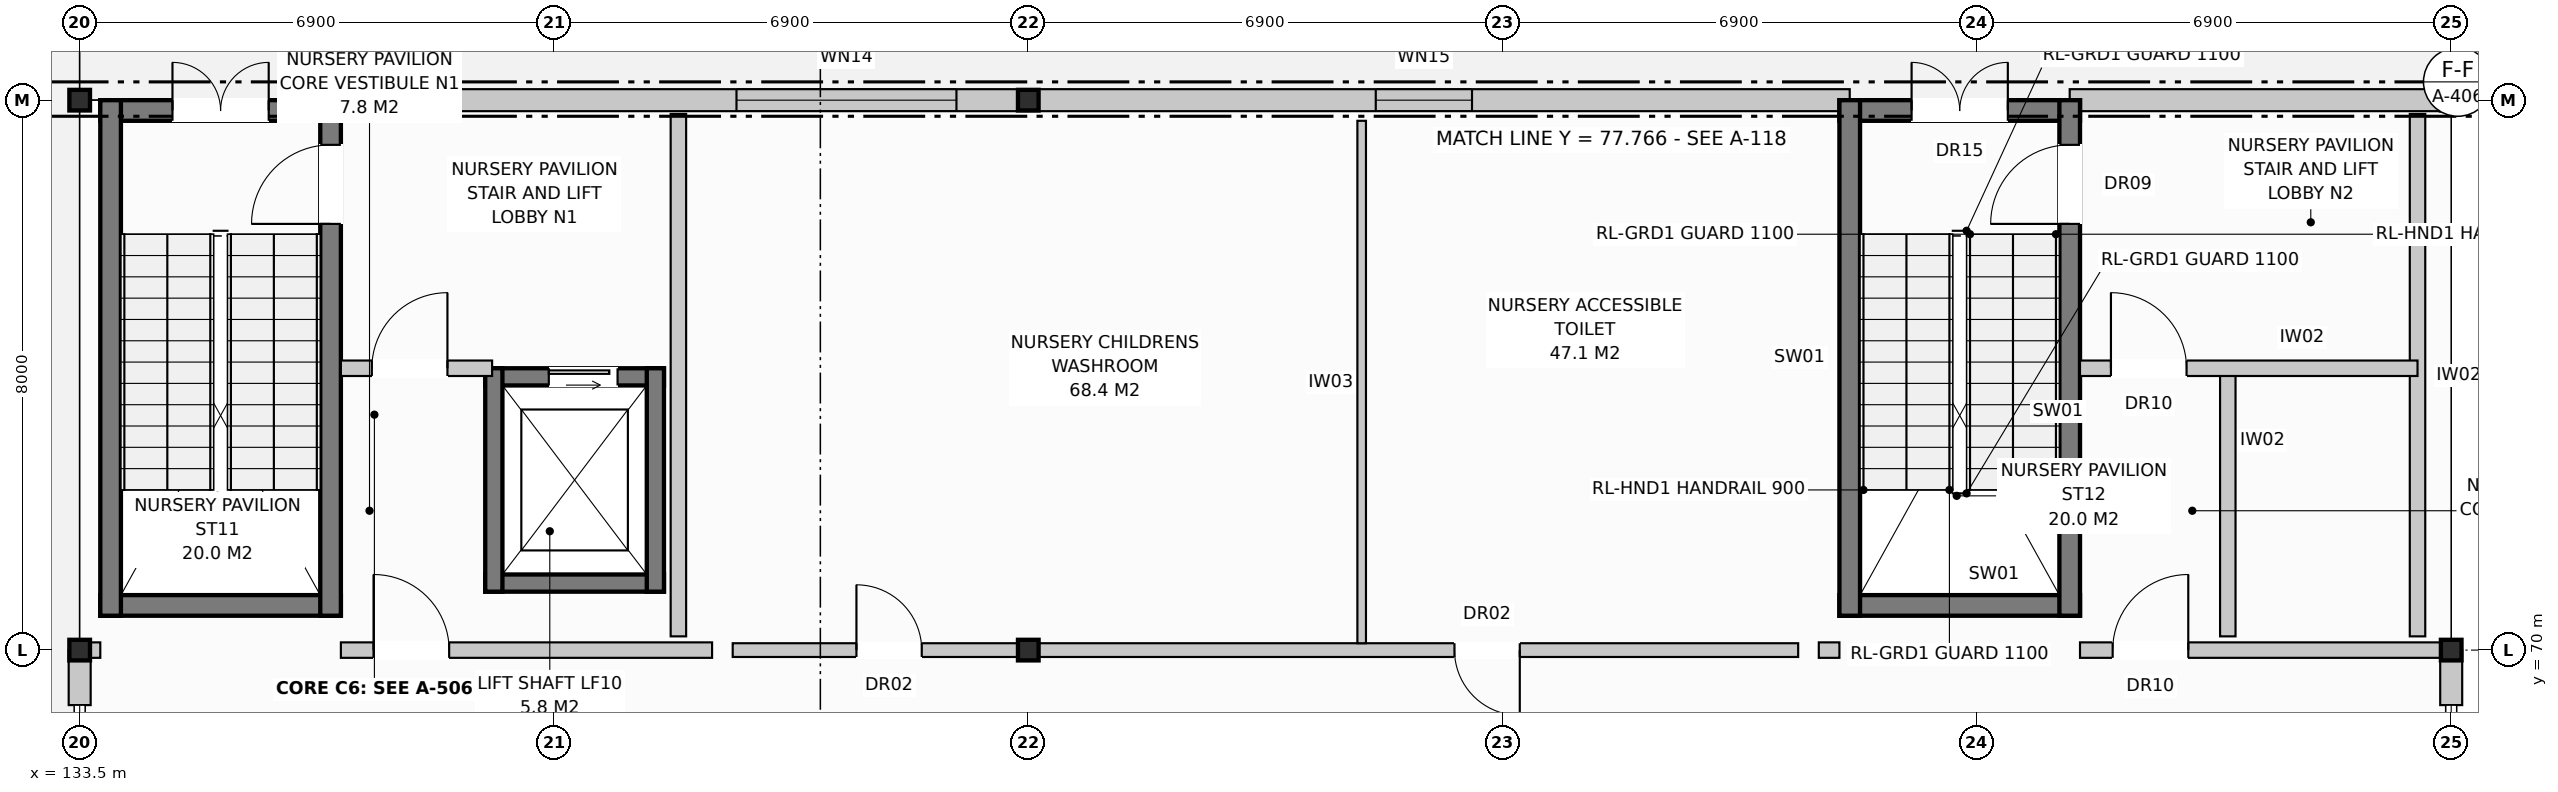
"""IFC4 building model, lengths in metres.
Left out: names, types, materials, properties, quantities, classifications, styles, units other than length and angle.
Written with IfcOpenShell. Run it as: python <this file> out.ifc"""

import sys

from ifc_helpers import new_model, si_unit, direction, frame, frame_2d, origin, origin_with_axes, origin_2d, place, context, subcontext, project, spatial, rectangle, i_section, extrude, element, fill, save


model = new_model("IFC4")
c1 = context("Model", 3, precision=1e-05, world=origin(), true_north=direction((0.0, 1.0)))
c2 = subcontext(c1, "Body", "Model", "MODEL_VIEW")
j1 = project(units=[si_unit("LENGTHUNIT", "METRE"), si_unit("PLANEANGLEUNIT", "RADIAN")], contexts=[c1])
p1 = place(None, origin())
s1 = spatial("IfcSite", under=j1, at=p1, CompositionType="ELEMENT")
p2 = place(p1, origin())
s2 = spatial("IfcBuilding", under=s1, at=p2, CompositionType="ELEMENT")
p3 = place(p2, origin())
s3 = spatial("IfcBuildingStorey", under=s2, at=p3, CompositionType="ELEMENT", Elevation=0.0)
for number, where, z_axis, x_axis in (
    (1, (133.5, 70.0, 0.0), (0.0, 0.0, 1.0), (1.0, 0.0, 0.0)),
    (2, (133.5, 78.0, 0.0), (0.0, 0.0, 1.0), (1.0, 0.0, 0.0)),
    (3, (147.3, 70.0, 0.0), (0.0, 0.0, 1.0), (1.0, 0.0, 0.0)),
    (4, (147.3, 78.0, 0.0), (0.0, 0.0, 1.0), (1.0, 0.0, 0.0)),
    (5, (168.0, 70.0, 0.0), (0.0, 0.0, 1.0), (1.0, 0.0, 0.0)),
    (6, (168.0, 78.0, 0.0), (0.0, 0.0, 1.0), (1.0, 0.0, 0.0)),
):
    element("IfcColumn", number, at=place(p3, frame(where, z_axis=z_axis, x_axis=x_axis)), inside=s3, PredefinedType="COLUMN", context=c2, shape_type="SweptSolid", body=[
        extrude(i_section(OverallWidth=0.3, OverallDepth=0.3, WebThickness=0.011, FlangeThickness=0.019, at=origin_2d()), origin(), (0.0, 0.0, 1.0), 4.4),
    ])
for number, where, z_axis, x_axis in (
    (7, (133.5, 69.2, 0.0), (0.0, 0.0, 1.0), (0.0, 1.0, 0.0)),
    (8, (168.0, 69.2, 0.0), (0.0, 0.0, 1.0), (0.0, 1.0, 0.0)),
):
    element("IfcWall", number, at=place(p3, frame(where, z_axis=z_axis, x_axis=x_axis)), inside=s3, PredefinedType="STANDARD", context=c2, shape_type="SweptSolid", body=[
        extrude(rectangle(XDim=0.8, YDim=0.32, at=frame_2d((0.4, 0.0))), origin(), (0.0, 0.0, 1.0), 3.66),
    ])
p4 = place(p3, frame((137.05, 78.0, 0.0), z_axis=(0.0, 0.0, 1.0), x_axis=(1.0, 0.0, 0.0)))
e9 = element("IfcWall", 9, at=p4, inside=s3, PredefinedType="STANDARD", context=c2, shape_type="SweptSolid", body=[
    extrude(rectangle(XDim=22.2, YDim=0.32, at=frame_2d((11.1, 0.0))), origin(), (0.0, 0.0, 1.0), 3.57),
])
p5 = place(p4, frame((6.005, 0.0, 0.95)))
e10 = element("IfcOpeningElement", 10, at=p5, cuts=e9, PredefinedType="OPENING", context=c2, shape_type="SweptSolid", body=[
    extrude(rectangle(XDim=3.2, YDim=2.2, at=frame_2d((1.6, 1.1))), frame((0.0, 0.172, 0.0), z_axis=(0.0, -1.0, 0.0), x_axis=(1.0, 0.0, 0.0)), (0.0, 0.0, 1.0), 0.344),
])
p6 = place(p4, frame((15.305, 0.0, 1.05)))
e11 = element("IfcOpeningElement", 11, at=p6, cuts=e9, PredefinedType="OPENING", context=c2, shape_type="SweptSolid", body=[
    extrude(rectangle(XDim=1.4, YDim=1.25, at=frame_2d((0.7, 0.625))), frame((0.0, 0.172, 0.0), z_axis=(0.0, -1.0, 0.0), x_axis=(1.0, 0.0, 0.0)), (0.0, 0.0, 1.0), 0.344),
])
p7 = place(p3, frame((162.45, 78.0, 0.0), z_axis=(0.0, 0.0, 1.0), x_axis=(1.0, 0.0, 0.0)))
e12 = element("IfcWall", 12, at=p7, inside=s3, PredefinedType="STANDARD", context=c2, shape_type="SweptSolid", body=[
    extrude(rectangle(XDim=5.55, YDim=0.32, at=frame_2d((2.775, 0.0))), origin(), (0.0, 0.0, 1.0), 3.57),
])
p8 = place(p3, frame((133.8, 77.85, 0.0), z_axis=(0.0, 0.0, 1.0), x_axis=(1.0, 0.0, 0.0)))
e13 = element("IfcWall", 13, at=p8, inside=s3, PredefinedType="SHEAR", context=c2, shape_type="SweptSolid", body=[
    extrude(rectangle(XDim=3.5, YDim=0.3, at=frame_2d((1.75, 0.0))), origin(), (0.0, 0.0, 1.0), 4.12),
])
p9 = place(p8, frame((1.05, 0.0, 0.0)))
e14 = element("IfcOpeningElement", 14, at=p9, cuts=e13, PredefinedType="OPENING", context=c2, shape_type="SweptSolid", body=[
    extrude(rectangle(XDim=1.4, YDim=2.25, at=frame_2d((0.7, 1.125))), frame((0.0, 0.162, 0.0), z_axis=(0.0, -1.0, 0.0), x_axis=(1.0, 0.0, 0.0)), (0.0, 0.0, 1.0), 0.324),
])
p10 = place(p3, frame((133.8, 70.65, 0.0), z_axis=(0.0, 0.0, 1.0), x_axis=(1.0, 0.0, 0.0)))
e15 = element("IfcWall", 15, at=p10, inside=s3, PredefinedType="SHEAR", context=c2, shape_type="SweptSolid", body=[
    extrude(rectangle(XDim=3.5, YDim=0.3, at=frame_2d((1.75, 0.0))), origin(), (0.0, 0.0, 1.0), 4.12),
])
p11 = place(p3, frame((133.95, 70.5, 0.0), z_axis=(0.0, 0.0, 1.0), x_axis=(0.0, 1.0, 0.0)))
e16 = element("IfcWall", 16, at=p11, inside=s3, PredefinedType="SHEAR", context=c2, shape_type="SweptSolid", body=[
    extrude(rectangle(XDim=7.5, YDim=0.3, at=frame_2d((3.75, 0.0))), origin(), (0.0, 0.0, 1.0), 4.12),
])
p12 = place(p3, frame((137.15, 70.5, 0.0), z_axis=(0.0, 0.0, 1.0), x_axis=(0.0, 1.0, 0.0)))
e17 = element("IfcWall", 17, at=p12, inside=s3, PredefinedType="SHEAR", context=c2, shape_type="SweptSolid", body=[
    extrude(rectangle(XDim=7.5, YDim=0.3, at=frame_2d((3.75, 0.0))), origin(), (0.0, 0.0, 1.0), 4.12),
])
p13 = place(p12, frame((5.7, 0.0, 0.0)))
e18 = element("IfcOpeningElement", 18, at=p13, cuts=e17, PredefinedType="OPENING", context=c2, shape_type="SweptSolid", body=[
    extrude(rectangle(XDim=1.15, YDim=2.15, at=frame_2d((0.575, 1.075))), frame((0.0, 0.162, 0.0), z_axis=(0.0, -1.0, 0.0), x_axis=(1.0, 0.0, 0.0)), (0.0, 0.0, 1.0), 0.324),
])
p14 = place(p3, frame((139.4, 73.975, 0.0), z_axis=(0.0, 0.0, 1.0), x_axis=(1.0, 0.0, 0.0)))
e19 = element("IfcWall", 19, at=p14, inside=s3, PredefinedType="SHEAR", context=c2, shape_type="SweptSolid", body=[
    extrude(rectangle(XDim=2.6, YDim=0.25, at=frame_2d((1.3, 0.0))), origin(), (0.0, 0.0, 1.0), 4.12),
])
p15 = place(p14, frame((0.925, 0.0, 0.0)))
e20 = element("IfcOpeningElement", 20, at=p15, cuts=e19, PredefinedType="OPENING", context=c2, shape_type="SweptSolid", body=[
    extrude(rectangle(XDim=1.0, YDim=2.1, at=frame_2d((0.5, 1.05))), frame((0.0, 0.137, 0.0), z_axis=(0.0, -1.0, 0.0), x_axis=(1.0, 0.0, 0.0)), (0.0, 0.0, 1.0), 0.274),
])
p16 = place(p3, frame((139.4, 70.975, 0.0), z_axis=(0.0, 0.0, 1.0), x_axis=(1.0, 0.0, 0.0)))
e21 = element("IfcWall", 21, at=p16, inside=s3, PredefinedType="SHEAR", context=c2, shape_type="SweptSolid", body=[
    extrude(rectangle(XDim=2.6, YDim=0.25, at=frame_2d((1.3, 0.0))), origin(), (0.0, 0.0, 1.0), 4.12),
])
for number, where, z_axis, x_axis in (
    (22, (139.525, 70.85, 0.0), (0.0, 0.0, 1.0), (0.0, 1.0, 0.0)),
    (23, (141.875, 70.85, 0.0), (0.0, 0.0, 1.0), (0.0, 1.0, 0.0)),
):
    element("IfcWall", number, at=place(p3, frame(where, z_axis=z_axis, x_axis=x_axis)), inside=s3, PredefinedType="SHEAR", context=c2, shape_type="SweptSolid", body=[
        extrude(rectangle(XDim=3.25, YDim=0.25, at=frame_2d((1.625, 0.0))), origin(), (0.0, 0.0, 1.0), 4.12),
    ])
p17 = place(p3, frame((142.21, 70.2, 0.0), z_axis=(0.0, 0.0, 1.0), x_axis=(0.0, 1.0, 0.0)))
e24 = element("IfcWall", 24, at=p17, inside=s3, PredefinedType="PARTITIONING", context=c2, shape_type="SweptSolid", body=[
    extrude(rectangle(XDim=7.6, YDim=0.225, at=frame_2d((3.8, 0.0))), origin(), (0.0, 0.0, 1.0), 4.12),
])
p18 = place(p3, frame((137.3, 74.1, 0.0), z_axis=(0.0, 0.0, 1.0), x_axis=(1.0, 0.0, 0.0)))
e25 = element("IfcWall", 25, at=p18, inside=s3, PredefinedType="PARTITIONING", context=c2, shape_type="SweptSolid", body=[
    extrude(rectangle(XDim=2.2, YDim=0.225, at=frame_2d((1.1, 0.0))), origin(), (0.0, 0.0, 1.0), 4.12),
])
p19 = place(p18, frame((0.45, 0.0, 0.0)))
e26 = element("IfcOpeningElement", 26, at=p19, cuts=e25, PredefinedType="OPENING", context=c2, shape_type="SweptSolid", body=[
    extrude(rectangle(XDim=1.1, YDim=2.15, at=frame_2d((0.55, 1.075))), frame((0.0, 0.125, 0.0), z_axis=(0.0, -1.0, 0.0), x_axis=(1.0, 0.0, 0.0)), (0.0, 0.0, 1.0), 0.249),
])
p20 = place(p3, frame((133.65, 70.0, 0.0), z_axis=(0.0, 0.0, 1.0), x_axis=(1.0, 0.0, 0.0)))
e27 = element("IfcWall", 27, at=p20, inside=s3, PredefinedType="PARTITIONING", context=c2, shape_type="SweptSolid", body=[
    extrude(rectangle(XDim=0.15, YDim=0.225, at=frame_2d((0.075, 0.0))), origin(), (0.0, 0.0, 1.0), 4.12),
])
p21 = place(p3, frame((137.3, 70.0, 0.0), z_axis=(0.0, 0.0, 1.0), x_axis=(1.0, 0.0, 0.0)))
e28 = element("IfcWall", 28, at=p21, inside=s3, PredefinedType="PARTITIONING", context=c2, shape_type="SweptSolid", body=[
    extrude(rectangle(XDim=5.4, YDim=0.225, at=frame_2d((2.7, 0.0))), origin(), (0.0, 0.0, 1.0), 3.67),
])
p22 = place(p21, frame((0.475, 0.0, 0.0)))
e29 = element("IfcOpeningElement", 29, at=p22, cuts=e28, PredefinedType="OPENING", context=c2, shape_type="SweptSolid", body=[
    extrude(rectangle(XDim=1.1, YDim=2.15, at=frame_2d((0.55, 1.075))), frame((0.0, 0.125, 0.0), z_axis=(0.0, -1.0, 0.0), x_axis=(1.0, 0.0, 0.0)), (0.0, 0.0, 1.0), 0.249),
])
p23 = place(p3, frame((159.1, 77.85, 0.0), z_axis=(0.0, 0.0, 1.0), x_axis=(1.0, 0.0, 0.0)))
e30 = element("IfcWall", 30, at=p23, inside=s3, PredefinedType="SHEAR", context=c2, shape_type="SweptSolid", body=[
    extrude(rectangle(XDim=3.5, YDim=0.3, at=frame_2d((1.75, 0.0))), origin(), (0.0, 0.0, 1.0), 4.12),
])
p24 = place(p23, frame((1.05, 0.0, 0.0)))
e31 = element("IfcOpeningElement", 31, at=p24, cuts=e30, PredefinedType="OPENING", context=c2, shape_type="SweptSolid", body=[
    extrude(rectangle(XDim=1.4, YDim=2.25, at=frame_2d((0.7, 1.125))), frame((0.0, 0.162, 0.0), z_axis=(0.0, -1.0, 0.0), x_axis=(1.0, 0.0, 0.0)), (0.0, 0.0, 1.0), 0.324),
])
p25 = place(p3, frame((159.1, 70.65, 0.0), z_axis=(0.0, 0.0, 1.0), x_axis=(1.0, 0.0, 0.0)))
e32 = element("IfcWall", 32, at=p25, inside=s3, PredefinedType="SHEAR", context=c2, shape_type="SweptSolid", body=[
    extrude(rectangle(XDim=3.5, YDim=0.3, at=frame_2d((1.75, 0.0))), origin(), (0.0, 0.0, 1.0), 4.12),
])
p26 = place(p3, frame((159.25, 70.5, 0.0), z_axis=(0.0, 0.0, 1.0), x_axis=(0.0, 1.0, 0.0)))
e33 = element("IfcWall", 33, at=p26, inside=s3, PredefinedType="SHEAR", context=c2, shape_type="SweptSolid", body=[
    extrude(rectangle(XDim=7.5, YDim=0.3, at=frame_2d((3.75, 0.0))), origin(), (0.0, 0.0, 1.0), 4.12),
])
p27 = place(p3, frame((162.45, 70.5, 0.0), z_axis=(0.0, 0.0, 1.0), x_axis=(0.0, 1.0, 0.0)))
e34 = element("IfcWall", 34, at=p27, inside=s3, PredefinedType="SHEAR", context=c2, shape_type="SweptSolid", body=[
    extrude(rectangle(XDim=7.5, YDim=0.3, at=frame_2d((3.75, 0.0))), origin(), (0.0, 0.0, 1.0), 4.12),
])
p28 = place(p27, frame((5.7, 0.0, 0.0)))
e35 = element("IfcOpeningElement", 35, at=p28, cuts=e34, PredefinedType="OPENING", context=c2, shape_type="SweptSolid", body=[
    extrude(rectangle(XDim=1.15, YDim=2.15, at=frame_2d((0.575, 1.075))), frame((0.0, 0.162, 0.0), z_axis=(0.0, -1.0, 0.0), x_axis=(1.0, 0.0, 0.0)), (0.0, 0.0, 1.0), 0.324),
])
p29 = place(p3, frame((167.51, 70.2, 0.0), z_axis=(0.0, 0.0, 1.0), x_axis=(0.0, 1.0, 0.0)))
e36 = element("IfcWall", 36, at=p29, inside=s3, PredefinedType="PARTITIONING", context=c2, shape_type="SweptSolid", body=[
    extrude(rectangle(XDim=7.6, YDim=0.225, at=frame_2d((3.8, 0.0))), origin(), (0.0, 0.0, 1.0), 4.12),
])
p30 = place(p3, frame((164.75, 70.2, 0.0), z_axis=(0.0, 0.0, 1.0), x_axis=(0.0, 1.0, 0.0)))
e37 = element("IfcWall", 37, at=p30, inside=s3, PredefinedType="PARTITIONING", context=c2, shape_type="SweptSolid", body=[
    extrude(rectangle(XDim=3.8, YDim=0.225, at=frame_2d((1.9, 0.0))), origin(), (0.0, 0.0, 1.0), 4.12),
])
p31 = place(p3, frame((162.6, 74.1, 0.0), z_axis=(0.0, 0.0, 1.0), x_axis=(1.0, 0.0, 0.0)))
e38 = element("IfcWall", 38, at=p31, inside=s3, PredefinedType="PARTITIONING", context=c2, shape_type="SweptSolid", body=[
    extrude(rectangle(XDim=4.91, YDim=0.225, at=frame_2d((2.455, 0.0))), origin(), (0.0, 0.0, 1.0), 4.12),
])
p32 = place(p31, frame((0.45, 0.0, 0.0)))
e39 = element("IfcOpeningElement", 39, at=p32, cuts=e38, PredefinedType="OPENING", context=c2, shape_type="SweptSolid", body=[
    extrude(rectangle(XDim=1.1, YDim=2.15, at=frame_2d((0.55, 1.075))), frame((0.0, 0.125, 0.0), z_axis=(0.0, -1.0, 0.0), x_axis=(1.0, 0.0, 0.0)), (0.0, 0.0, 1.0), 0.249),
])
p33 = place(p3, frame((158.8, 70.0, 0.0), z_axis=(0.0, 0.0, 1.0), x_axis=(1.0, 0.0, 0.0)))
e40 = element("IfcWall", 40, at=p33, inside=s3, PredefinedType="PARTITIONING", context=c2, shape_type="SweptSolid", body=[
    extrude(rectangle(XDim=0.3, YDim=0.225, at=frame_2d((0.15, 0.0))), origin(), (0.0, 0.0, 1.0), 4.12),
])
p34 = place(p3, frame((162.6, 70.0, 0.0), z_axis=(0.0, 0.0, 1.0), x_axis=(1.0, 0.0, 0.0)))
e41 = element("IfcWall", 41, at=p34, inside=s3, PredefinedType="PARTITIONING", context=c2, shape_type="SweptSolid", body=[
    extrude(rectangle(XDim=5.25, YDim=0.225, at=frame_2d((2.625, 0.0))), origin(), (0.0, 0.0, 1.0), 3.57),
])
p35 = place(p34, frame((0.475, 0.0, 0.0)))
e42 = element("IfcOpeningElement", 42, at=p35, cuts=e41, PredefinedType="OPENING", context=c2, shape_type="SweptSolid", body=[
    extrude(rectangle(XDim=1.1, YDim=2.15, at=frame_2d((0.55, 1.075))), frame((0.0, 0.125, 0.0), z_axis=(0.0, -1.0, 0.0), x_axis=(1.0, 0.0, 0.0)), (0.0, 0.0, 1.0), 0.249),
])
p36 = place(p3, frame((143.0, 70.0, 0.0), z_axis=(0.0, 0.0, 1.0), x_axis=(1.0, 0.0, 0.0)))
e43 = element("IfcWall", 43, at=p36, inside=s3, PredefinedType="PARTITIONING", context=c2, shape_type="SweptSolid", body=[
    extrude(rectangle(XDim=15.5, YDim=0.2, at=frame_2d((7.75, 0.0))), origin(), (0.0, 0.0, 1.0), 3.57),
])
p37 = place(p36, frame((1.8, 0.0, 0.0)))
e44 = element("IfcOpeningElement", 44, at=p37, cuts=e43, PredefinedType="OPENING", context=c2, shape_type="SweptSolid", body=[
    extrude(rectangle(XDim=0.95, YDim=2.15, at=frame_2d((0.475, 1.075))), frame((0.0, 0.112, 0.0), z_axis=(0.0, -1.0, 0.0), x_axis=(1.0, 0.0, 0.0)), (0.0, 0.0, 1.0), 0.224),
])
p38 = place(p36, frame((10.5, 0.0, 0.0)))
e45 = element("IfcOpeningElement", 45, at=p38, cuts=e43, PredefinedType="OPENING", context=c2, shape_type="SweptSolid", body=[
    extrude(rectangle(XDim=0.95, YDim=2.15, at=frame_2d((0.475, 1.075))), frame((0.0, 0.112, 0.0), z_axis=(0.0, -1.0, 0.0), x_axis=(1.0, 0.0, 0.0)), (0.0, 0.0, 1.0), 0.224),
])
p39 = place(p3, frame((152.15, 70.1, 0.0), z_axis=(0.0, 0.0, 1.0), x_axis=(0.0, 1.0, 0.0)))
e46 = element("IfcWall", 46, at=p39, inside=s3, PredefinedType="PARTITIONING", context=c2, shape_type="SweptSolid", body=[
    extrude(rectangle(XDim=7.6, YDim=0.125, at=frame_2d((3.8, 0.0))), origin(), (0.0, 0.0, 1.0), 4.12),
])
p40 = place(p5, origin_with_axes())
e47 = element("IfcWindow", 47, at=p40, inside=s3, PartitioningType="SINGLE_PANEL", PredefinedType="WINDOW", context=c2, shape_type="SweptSolid", body=[
    extrude(rectangle(XDim=3.2, YDim=2.2, at=frame_2d((1.6, 1.1))), frame((0.0, 0.03, 0.0), z_axis=(0.0, -1.0, 0.0), x_axis=(1.0, 0.0, 0.0)), (0.0, 0.0, 1.0), 0.06),
])
fill(e10, e47)
p41 = place(p6, origin_with_axes())
e48 = element("IfcWindow", 48, at=p41, inside=s3, PartitioningType="SINGLE_PANEL", PredefinedType="WINDOW", context=c2, shape_type="SweptSolid", body=[
    extrude(rectangle(XDim=1.4, YDim=1.25, at=frame_2d((0.7, 0.625))), frame((0.0, 0.03, 0.0), z_axis=(0.0, -1.0, 0.0), x_axis=(1.0, 0.0, 0.0)), (0.0, 0.0, 1.0), 0.06),
])
fill(e11, e48)
p42 = place(p9, origin_with_axes())
e49 = element("IfcDoor", 49, at=p42, inside=s3, OperationType="DOUBLE_DOOR_SINGLE_SWING", PredefinedType="DOOR", context=c2, shape_type="SweptSolid", body=[
    extrude(rectangle(XDim=1.4, YDim=2.25, at=frame_2d((0.7, 1.125))), frame((0.0, 0.025, 0.0), z_axis=(0.0, -1.0, 0.0), x_axis=(1.0, 0.0, 0.0)), (0.0, 0.0, 1.0), 0.05),
])
fill(e14, e49)
p43 = place(p13, origin_with_axes())
e50 = element("IfcDoor", 50, at=p43, inside=s3, OperationType="SINGLE_SWING_LEFT", PredefinedType="DOOR", context=c2, shape_type="SweptSolid", body=[
    extrude(rectangle(XDim=1.15, YDim=2.15, at=frame_2d((0.575, 1.075))), frame((0.0, 0.025, 0.0), z_axis=(0.0, -1.0, 0.0), x_axis=(1.0, 0.0, 0.0)), (0.0, 0.0, 1.0), 0.05),
])
fill(e18, e50)
p44 = place(p15, origin_with_axes())
e51 = element("IfcDoor", 51, at=p44, inside=s3, OperationType="SLIDING_TO_LEFT", PredefinedType="DOOR", context=c2, shape_type="SweptSolid", body=[
    extrude(rectangle(XDim=1.0, YDim=2.1, at=frame_2d((0.5, 1.05))), frame((0.0, 0.025, 0.0), z_axis=(0.0, -1.0, 0.0), x_axis=(1.0, 0.0, 0.0)), (0.0, 0.0, 1.0), 0.05),
])
fill(e20, e51)
p45 = place(p19, origin_with_axes())
e52 = element("IfcDoor", 52, at=p45, inside=s3, OperationType="SINGLE_SWING_RIGHT", PredefinedType="DOOR", context=c2, shape_type="SweptSolid", body=[
    extrude(rectangle(XDim=1.1, YDim=2.15, at=frame_2d((0.55, 1.075))), frame((0.0, 0.025, 0.0), z_axis=(0.0, -1.0, 0.0), x_axis=(1.0, 0.0, 0.0)), (0.0, 0.0, 1.0), 0.05),
])
fill(e26, e52)
p46 = place(p22, origin_with_axes())
e53 = element("IfcDoor", 53, at=p46, inside=s3, OperationType="SINGLE_SWING_LEFT", PredefinedType="DOOR", context=c2, shape_type="SweptSolid", body=[
    extrude(rectangle(XDim=1.1, YDim=2.15, at=frame_2d((0.55, 1.075))), frame((0.0, 0.025, 0.0), z_axis=(0.0, -1.0, 0.0), x_axis=(1.0, 0.0, 0.0)), (0.0, 0.0, 1.0), 0.05),
])
fill(e29, e53)
p47 = place(p24, origin_with_axes())
e54 = element("IfcDoor", 54, at=p47, inside=s3, OperationType="DOUBLE_DOOR_SINGLE_SWING", PredefinedType="DOOR", context=c2, shape_type="SweptSolid", body=[
    extrude(rectangle(XDim=1.4, YDim=2.25, at=frame_2d((0.7, 1.125))), frame((0.0, 0.025, 0.0), z_axis=(0.0, -1.0, 0.0), x_axis=(1.0, 0.0, 0.0)), (0.0, 0.0, 1.0), 0.05),
])
fill(e31, e54)
p48 = place(p28, origin_with_axes())
e55 = element("IfcDoor", 55, at=p48, inside=s3, OperationType="SINGLE_SWING_LEFT", PredefinedType="DOOR", context=c2, shape_type="SweptSolid", body=[
    extrude(rectangle(XDim=1.15, YDim=2.15, at=frame_2d((0.575, 1.075))), frame((0.0, 0.025, 0.0), z_axis=(0.0, -1.0, 0.0), x_axis=(1.0, 0.0, 0.0)), (0.0, 0.0, 1.0), 0.05),
])
fill(e35, e55)
p49 = place(p32, origin_with_axes())
e56 = element("IfcDoor", 56, at=p49, inside=s3, OperationType="SINGLE_SWING_LEFT", PredefinedType="DOOR", context=c2, shape_type="SweptSolid", body=[
    extrude(rectangle(XDim=1.1, YDim=2.15, at=frame_2d((0.55, 1.075))), frame((0.0, 0.025, 0.0), z_axis=(0.0, -1.0, 0.0), x_axis=(1.0, 0.0, 0.0)), (0.0, 0.0, 1.0), 0.05),
])
fill(e39, e56)
p50 = place(p35, origin_with_axes())
e57 = element("IfcDoor", 57, at=p50, inside=s3, OperationType="SINGLE_SWING_RIGHT", PredefinedType="DOOR", context=c2, shape_type="SweptSolid", body=[
    extrude(rectangle(XDim=1.1, YDim=2.15, at=frame_2d((0.55, 1.075))), frame((0.0, 0.025, 0.0), z_axis=(0.0, -1.0, 0.0), x_axis=(1.0, 0.0, 0.0)), (0.0, 0.0, 1.0), 0.05),
])
fill(e42, e57)
p51 = place(p37, origin_with_axes())
e58 = element("IfcDoor", 58, at=p51, inside=s3, OperationType="SINGLE_SWING_LEFT", PredefinedType="DOOR", context=c2, shape_type="SweptSolid", body=[
    extrude(rectangle(XDim=0.95, YDim=2.15, at=frame_2d((0.475, 1.075))), frame((0.0, 0.025, 0.0), z_axis=(0.0, -1.0, 0.0), x_axis=(1.0, 0.0, 0.0)), (0.0, 0.0, 1.0), 0.05),
])
fill(e44, e58)
p52 = place(p38, frame((0.95, 0.0, 0.0), z_axis=(0.0, 0.0, 1.0), x_axis=(-1.0, 0.0, 0.0)))
e59 = element("IfcDoor", 59, at=p52, inside=s3, OperationType="SINGLE_SWING_RIGHT", PredefinedType="DOOR", context=c2, shape_type="SweptSolid", body=[
    extrude(rectangle(XDim=0.95, YDim=2.15, at=frame_2d((0.475, 1.075))), frame((0.0, 0.025, 0.0), z_axis=(0.0, -1.0, 0.0), x_axis=(1.0, 0.0, 0.0)), (0.0, 0.0, 1.0), 0.05),
])
fill(e45, e59)
save(model, sys.argv[1])
